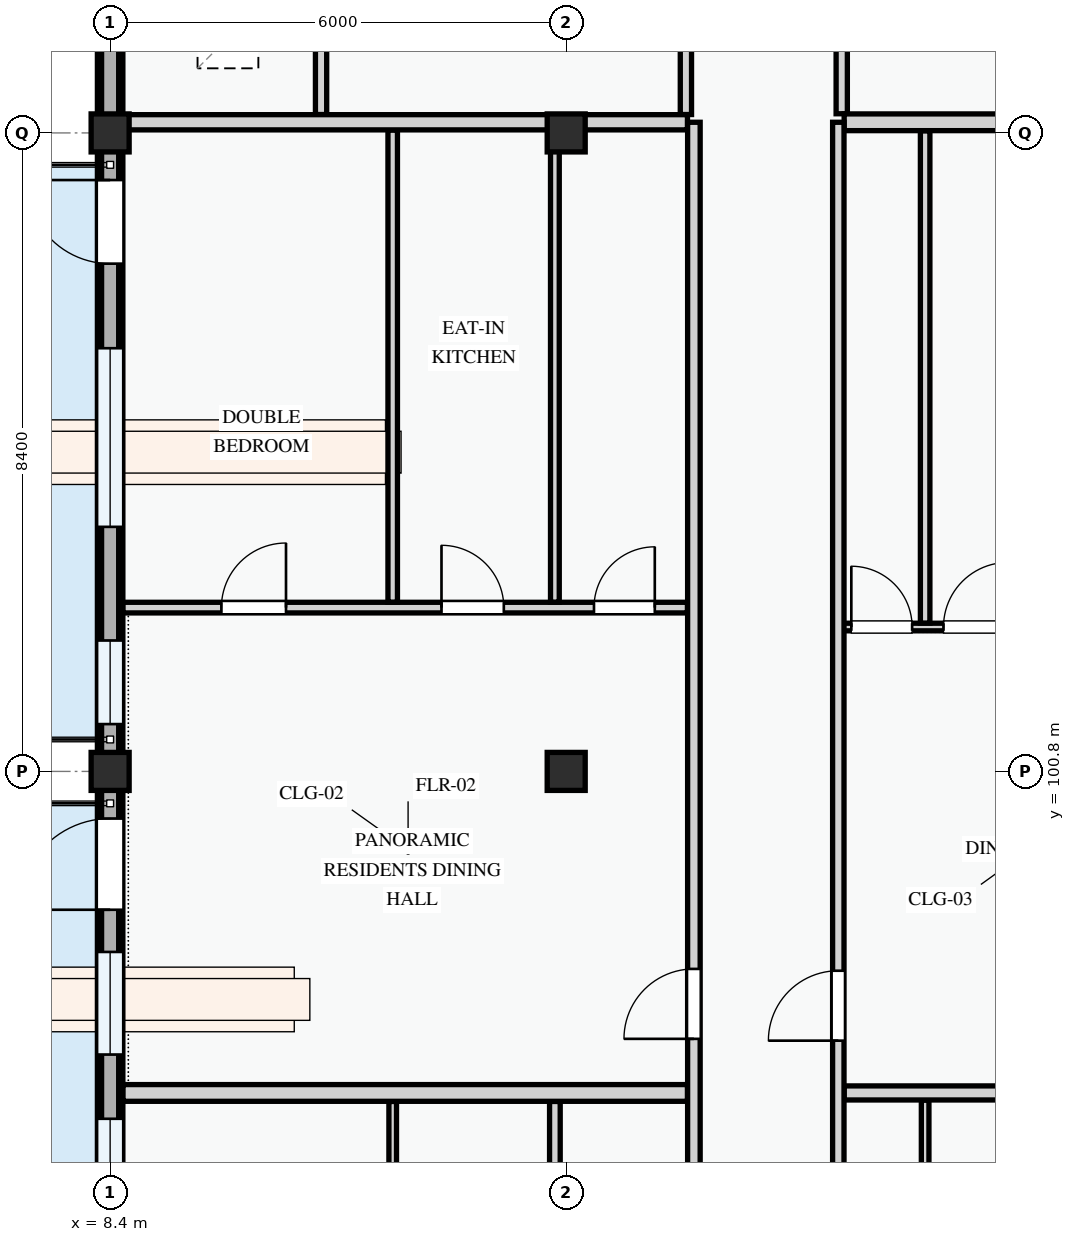
"""IFC4 building model, lengths in metres.
Left out: names, types, materials, properties, quantities, classifications, styles, units other than length and angle.
Written with IfcOpenShell. Run it as: python <this file> out.ifc"""

import sys

from ifc_helpers import new_model, si_unit, direction, frame, frame_2d, origin, origin_2d, place, context, subcontext, project, spatial, polyline, rectangle, outline, extrude, element, fill, save


model = new_model("IFC4")
c1 = context("Model", 3, precision=1e-05, world=origin(), true_north=direction((0.0, 1.0)))
c2 = subcontext(c1, "Body", "Model", "MODEL_VIEW")
j1 = project(units=[si_unit("LENGTHUNIT", "METRE"), si_unit("PLANEANGLEUNIT", "RADIAN")], contexts=[c1])
p1 = place(None, origin())
s1 = spatial("IfcSite", under=j1, at=p1, CompositionType="ELEMENT")
p2 = place(p1, origin())
s2 = spatial("IfcBuilding", under=s1, at=p2, CompositionType="ELEMENT")
p3 = place(p2, frame((0.0, 0.0, 51.0)))
s3 = spatial("IfcBuildingStorey", under=s2, at=p3, CompositionType="ELEMENT", Elevation=51.0)
for number, where, z_axis, x_axis in (
    (1, (8.4, 100.8, 0.0), (0.0, 0.0, 1.0), (1.0, 0.0, 0.0)),
    (2, (8.4, 109.2, 0.0), (0.0, 0.0, 1.0), (1.0, 0.0, 0.0)),
    (3, (14.4, 100.8, 0.0), (0.0, 0.0, 1.0), (1.0, 0.0, 0.0)),
    (4, (14.4, 109.2, 0.0), (0.0, 0.0, 1.0), (1.0, 0.0, 0.0)),
):
    element("IfcColumn", number, at=place(p3, frame(where, z_axis=z_axis, x_axis=x_axis)), inside=s3, PredefinedType="COLUMN", context=c2, shape_type="SweptSolid", body=[
        extrude(rectangle(XDim=0.5, YDim=0.5, at=origin_2d()), origin(), (0.0, 0.0, 1.0), 3.3),
    ])
p4 = place(p3, frame((8.4, 115.2, 0.0), z_axis=(0.0, 0.0, 1.0), x_axis=(0.0, -1.0, 0.0)))
e5 = element("IfcWall", 5, at=p4, inside=s3, PredefinedType="STANDARD", context=c2, shape_type="SweptSolid", body=[
    extrude(rectangle(XDim=6.0, YDim=0.335, at=frame_2d((3.0, 0.0))), origin(), (0.0, 0.0, 1.0), 2.595),
])
p5 = place(p4, frame((0.545, 0.0, 0.78)))
e6 = element("IfcOpeningElement", 6, at=p5, cuts=e5, PredefinedType="OPENING", context=c2, shape_type="SweptSolid", body=[
    extrude(rectangle(XDim=0.9, YDim=1.2, at=frame_2d((0.45, 0.6))), frame((0.0, 0.177, 0.0), z_axis=(0.0, -1.0, 0.0), x_axis=(1.0, 0.0, 0.0)), (0.0, 0.0, 1.0), 0.355),
])
p6 = place(p4, frame((2.815, 0.0, 0.78)))
e7 = element("IfcOpeningElement", 7, at=p6, cuts=e5, PredefinedType="OPENING", context=c2, shape_type="SweptSolid", body=[
    extrude(rectangle(XDim=1.98, YDim=1.5, at=frame_2d((0.99, 0.75))), frame((0.0, 0.177, 0.0), z_axis=(0.0, -1.0, 0.0), x_axis=(1.0, 0.0, 0.0)), (0.0, 0.0, 1.0), 0.355),
])
p7 = place(p3, frame((8.4, 109.2, 0.0), z_axis=(0.0, 0.0, 1.0), x_axis=(0.0, -1.0, 0.0)))
e8 = element("IfcWall", 8, at=p7, inside=s3, PredefinedType="STANDARD", context=c2, shape_type="SweptSolid", body=[
    extrude(rectangle(XDim=8.4, YDim=0.335, at=frame_2d((4.2, 0.0))), origin(), (0.0, 0.0, 1.0), 2.445),
])
p8 = place(p7, frame((0.62, 0.0, 0.0)))
e9 = element("IfcOpeningElement", 9, at=p8, cuts=e8, PredefinedType="OPENING", context=c2, shape_type="SweptSolid", body=[
    extrude(rectangle(XDim=1.1, YDim=2.15, at=frame_2d((0.55, 1.075))), frame((0.0, 0.177, 0.0), z_axis=(0.0, -1.0, 0.0), x_axis=(1.0, 0.0, 0.0)), (0.0, 0.0, 1.0), 0.355),
])
p9 = place(p7, frame((2.833, 0.0, 0.78)))
e10 = element("IfcOpeningElement", 10, at=p9, cuts=e8, PredefinedType="OPENING", context=c2, shape_type="SweptSolid", body=[
    extrude(rectangle(XDim=2.35, YDim=1.55, at=frame_2d((1.175, 0.775))), frame((0.0, 0.177, 0.0), z_axis=(0.0, -1.0, 0.0), x_axis=(1.0, 0.0, 0.0)), (0.0, 0.0, 1.0), 0.355),
])
p10 = place(p7, frame((6.677, 0.0, 0.78)))
e11 = element("IfcOpeningElement", 11, at=p10, cuts=e8, PredefinedType="OPENING", context=c2, shape_type="SweptSolid", body=[
    extrude(rectangle(XDim=1.1, YDim=1.3, at=frame_2d((0.55, 0.65))), frame((0.0, 0.177, 0.0), z_axis=(0.0, -1.0, 0.0), x_axis=(1.0, 0.0, 0.0)), (0.0, 0.0, 1.0), 0.355),
])
p11 = place(p3, frame((8.4, 100.8, 0.0), z_axis=(0.0, 0.0, 1.0), x_axis=(0.0, -1.0, 0.0)))
e12 = element("IfcWall", 12, at=p11, inside=s3, PredefinedType="STANDARD", context=c2, shape_type="SweptSolid", body=[
    extrude(rectangle(XDim=6.0, YDim=0.335, at=frame_2d((3.0, 0.0))), origin(), (0.0, 0.0, 1.0), 2.595),
])
p12 = place(p11, frame((0.62, 0.0, 0.0)))
e13 = element("IfcOpeningElement", 13, at=p12, cuts=e12, PredefinedType="OPENING", context=c2, shape_type="SweptSolid", body=[
    extrude(rectangle(XDim=1.2, YDim=2.15, at=frame_2d((0.6, 1.075))), frame((0.0, 0.177, 0.0), z_axis=(0.0, -1.0, 0.0), x_axis=(1.0, 0.0, 0.0)), (0.0, 0.0, 1.0), 0.355),
])
p13 = place(p11, frame((2.375, 0.0, 0.78)))
e14 = element("IfcOpeningElement", 14, at=p13, cuts=e12, PredefinedType="OPENING", context=c2, shape_type="SweptSolid", body=[
    extrude(rectangle(XDim=1.35, YDim=1.55, at=frame_2d((0.675, 0.775))), frame((0.0, 0.177, 0.0), z_axis=(0.0, -1.0, 0.0), x_axis=(1.0, 0.0, 0.0)), (0.0, 0.0, 1.0), 0.355),
])
p14 = place(p11, frame((4.57, 0.0, 0.78)))
e15 = element("IfcOpeningElement", 15, at=p14, cuts=e12, PredefinedType="OPENING", context=c2, shape_type="SweptSolid", body=[
    extrude(rectangle(XDim=0.9, YDim=1.2, at=frame_2d((0.45, 0.6))), frame((0.0, 0.177, 0.0), z_axis=(0.0, -1.0, 0.0), x_axis=(1.0, 0.0, 0.0)), (0.0, 0.0, 1.0), 0.355),
])
p15 = place(p3, frame((8.4, 115.2, 3.3), z_axis=(0.0, 0.0, 1.0), x_axis=(0.0, -1.0, 0.0)))
e16 = element("IfcWall", 16, at=p15, inside=s3, PredefinedType="PARAPET", context=c2, shape_type="SweptSolid", body=[
    extrude(outline(polyline([(0.0, 0.0), (6.0, 0.0), (6.0, 1.12), (5.5, 1.322), (5.0, 1.484), (4.5, 1.618), (4.0, 1.717), (3.5, 1.779), (3.0, 1.8), (2.5, 1.779), (2.0, 1.717), (1.5, 1.618), (1.0, 1.484), (0.5, 1.322), (0.0, 1.12), (0.0, 0.0)])), frame((0.0, 0.113, 0.0), z_axis=(0.0, -1.0, 0.0), x_axis=(1.0, 0.0, 0.0)), (0.0, 0.0, 1.0), 0.225),
])
p16 = place(p3, frame((8.4, 109.2, 3.3), z_axis=(0.0, 0.0, 1.0), x_axis=(0.0, -1.0, 0.0)))
e17 = element("IfcWall", 17, at=p16, inside=s3, PredefinedType="PARAPET", context=c2, shape_type="SweptSolid", body=[
    extrude(outline(polyline([(0.0, 0.0), (8.4, 0.0), (8.4, 1.12), (7.7, 1.322), (7.0, 1.484), (6.3, 1.618), (5.6, 1.717), (4.9, 1.779), (4.2, 1.8), (3.5, 1.779), (2.8, 1.717), (2.1, 1.618), (1.4, 1.484), (0.7, 1.322), (0.0, 1.12), (0.0, 0.0)])), frame((0.0, 0.113, 0.0), z_axis=(0.0, -1.0, 0.0), x_axis=(1.0, 0.0, 0.0)), (0.0, 0.0, 1.0), 0.225),
])
p17 = place(p3, frame((8.4, 100.8, 3.3), z_axis=(0.0, 0.0, 1.0), x_axis=(0.0, -1.0, 0.0)))
e18 = element("IfcWall", 18, at=p17, inside=s3, PredefinedType="PARAPET", context=c2, shape_type="SweptSolid", body=[
    extrude(outline(polyline([(0.0, 0.0), (6.0, 0.0), (6.0, 1.12), (5.5, 1.322), (5.0, 1.484), (4.5, 1.618), (4.0, 1.717), (3.5, 1.779), (3.0, 1.8), (2.5, 1.779), (2.0, 1.717), (1.5, 1.618), (1.0, 1.484), (0.5, 1.322), (0.0, 1.12), (0.0, 0.0)])), frame((0.0, 0.113, 0.0), z_axis=(0.0, -1.0, 0.0), x_axis=(1.0, 0.0, 0.0)), (0.0, 0.0, 1.0), 0.225),
])
for number, where, z_axis, x_axis in (
    (19, (11.175, 113.324, 0.0), (0.0, 0.0, 1.0), (0.0, -1.0, 0.0)),
    (20, (15.975, 113.324, 0.0), (0.0, 0.0, 1.0), (0.0, -1.0, 0.0)),
):
    element("IfcWall", number, at=place(p3, frame(where, z_axis=z_axis, x_axis=x_axis)), inside=s3, PredefinedType="PARTITIONING", context=c2, shape_type="SweptSolid", body=[
        extrude(rectangle(XDim=3.882, YDim=0.148, at=frame_2d((1.941, 0.0))), origin(), (0.0, 0.0, 1.0), 3.0),
    ])
p18 = place(p3, frame((18.025, 113.324, 0.0), z_axis=(0.0, 0.0, 1.0), x_axis=(0.0, -1.0, 0.0)))
e21 = element("IfcWall", 21, at=p18, inside=s3, PredefinedType="PARTITIONING", context=c2, shape_type="SweptSolid", body=[
    extrude(rectangle(XDim=3.872, YDim=0.148, at=frame_2d((1.936, 0.0))), origin(), (0.0, 0.0, 1.0), 3.0),
])
p19 = place(p3, frame((12.118, 91.574, 0.0), z_axis=(0.0, 0.0, 1.0), x_axis=(0.0, 1.0, 0.0)))
e22 = element("IfcWall", 22, at=p19, inside=s3, PredefinedType="PARTITIONING", context=c2, shape_type="SweptSolid", body=[
    extrude(rectangle(XDim=4.884, YDim=0.1, at=frame_2d((2.442, 0.0))), origin(), (0.0, 0.0, 1.0), 3.0),
])
p20 = place(p3, frame((14.251, 91.574, 0.0), z_axis=(0.0, 0.0, 1.0), x_axis=(0.0, 1.0, 0.0)))
e23 = element("IfcWall", 23, at=p20, inside=s3, PredefinedType="PARTITIONING", context=c2, shape_type="SweptSolid", body=[
    extrude(rectangle(XDim=4.884, YDim=0.14, at=frame_2d((2.442, 0.0))), origin(), (0.0, 0.0, 1.0), 2.445),
])
p21 = place(p3, frame((19.122, 91.377, 0.0), z_axis=(0.0, 0.0, 1.0), x_axis=(0.0, 1.0, 0.0)))
e24 = element("IfcWall", 24, at=p21, inside=s3, PredefinedType="PARTITIONING", context=c2, shape_type="SweptSolid", body=[
    extrude(rectangle(XDim=5.098, YDim=0.1, at=frame_2d((2.549, 0.0))), origin(), (0.0, 0.0, 1.0), 3.0),
])
p22 = place(p3, frame((8.57, 102.955, 0.0), z_axis=(0.0, 0.0, 1.0), x_axis=(1.0, 0.0, 0.0)))
e25 = element("IfcWall", 25, at=p22, inside=s3, PredefinedType="PARTITIONING", context=c2, shape_type="SweptSolid", body=[
    extrude(rectangle(XDim=7.426, YDim=0.14, at=frame_2d((3.713, 0.0))), origin(), (0.0, 0.0, 1.0), 3.0),
])
p23 = place(p22, frame((1.294, 0.0, 0.0)))
e26 = element("IfcOpeningElement", 26, at=p23, cuts=e25, PredefinedType="OPENING", context=c2, shape_type="SweptSolid", body=[
    extrude(rectangle(XDim=0.85, YDim=2.1, at=frame_2d((0.425, 1.05))), frame((0.0, 0.08, 0.0), z_axis=(0.0, -1.0, 0.0), x_axis=(1.0, 0.0, 0.0)), (0.0, 0.0, 1.0), 0.16),
])
p24 = place(p22, frame((4.19, 0.0, 0.0)))
e27 = element("IfcOpeningElement", 27, at=p24, cuts=e25, PredefinedType="OPENING", context=c2, shape_type="SweptSolid", body=[
    extrude(rectangle(XDim=0.82, YDim=2.08, at=frame_2d((0.41, 1.04))), frame((0.0, 0.08, 0.0), z_axis=(0.0, -1.0, 0.0), x_axis=(1.0, 0.0, 0.0)), (0.0, 0.0, 1.0), 0.16),
])
p25 = place(p22, frame((6.196, 0.0, 0.0)))
e28 = element("IfcOpeningElement", 28, at=p25, cuts=e25, PredefinedType="OPENING", context=c2, shape_type="SweptSolid", body=[
    extrude(rectangle(XDim=0.8, YDim=2.1, at=frame_2d((0.4, 1.05))), frame((0.0, 0.08, 0.0), z_axis=(0.0, -1.0, 0.0), x_axis=(1.0, 0.0, 0.0)), (0.0, 0.0, 1.0), 0.16),
])
p26 = place(p3, frame((12.118, 103.027, 0.0), z_axis=(0.0, 0.0, 1.0), x_axis=(0.0, 1.0, 0.0)))
e29 = element("IfcWall", 29, at=p26, inside=s3, PredefinedType="PARTITIONING", context=c2, shape_type="SweptSolid", body=[
    extrude(rectangle(XDim=6.211, YDim=0.125, at=frame_2d((3.105, 0.0))), origin(), (0.0, 0.0, 1.0), 3.0),
])
p27 = place(p3, frame((14.251, 103.027, 0.0), z_axis=(0.0, 0.0, 1.0), x_axis=(0.0, 1.0, 0.0)))
e30 = element("IfcWall", 30, at=p27, inside=s3, PredefinedType="PARTITIONING", context=c2, shape_type="SweptSolid", body=[
    extrude(rectangle(XDim=6.211, YDim=0.115, at=frame_2d((3.105, 0.0))), origin(), (0.0, 0.0, 1.0), 2.445),
])
p28 = place(p3, frame((17.98, 102.7, 0.0), z_axis=(0.0, 0.0, 1.0), x_axis=(1.0, 0.0, 0.0)))
e31 = element("IfcWall", 31, at=p28, inside=s3, PredefinedType="PARTITIONING", context=c2, shape_type="SweptSolid", body=[
    extrude(rectangle(XDim=4.651, YDim=0.1, at=frame_2d((2.325, 0.0))), origin(), (0.0, 0.0, 1.0), 3.0),
])
p29 = place(p28, frame((0.171, 0.0, 0.0)))
e32 = element("IfcOpeningElement", 32, at=p29, cuts=e31, PredefinedType="OPENING", context=c2, shape_type="SweptSolid", body=[
    extrude(rectangle(XDim=0.8, YDim=2.1, at=frame_2d((0.4, 1.05))), frame((0.0, 0.06, 0.0), z_axis=(0.0, -1.0, 0.0), x_axis=(1.0, 0.0, 0.0)), (0.0, 0.0, 1.0), 0.12),
])
p30 = place(p28, frame((1.384, 0.0, 0.0)))
e33 = element("IfcOpeningElement", 33, at=p30, cuts=e31, PredefinedType="OPENING", context=c2, shape_type="SweptSolid", body=[
    extrude(rectangle(XDim=0.85, YDim=2.1, at=frame_2d((0.425, 1.05))), frame((0.0, 0.06, 0.0), z_axis=(0.0, -1.0, 0.0), x_axis=(1.0, 0.0, 0.0)), (0.0, 0.0, 1.0), 0.12),
])
p31 = place(p28, frame((3.193, 0.0, 0.0)))
e34 = element("IfcOpeningElement", 34, at=p31, cuts=e31, PredefinedType="OPENING", context=c2, shape_type="SweptSolid", body=[
    extrude(rectangle(XDim=0.82, YDim=2.08, at=frame_2d((0.41, 1.04))), frame((0.0, 0.06, 0.0), z_axis=(0.0, -1.0, 0.0), x_axis=(1.0, 0.0, 0.0)), (0.0, 0.0, 1.0), 0.12),
])
p32 = place(p3, frame((19.122, 102.752, 0.0), z_axis=(0.0, 0.0, 1.0), x_axis=(0.0, 1.0, 0.0)))
e35 = element("IfcWall", 35, at=p32, inside=s3, PredefinedType="PARTITIONING", context=c2, shape_type="SweptSolid", body=[
    extrude(rectangle(XDim=6.476, YDim=0.125, at=frame_2d((3.238, 0.0))), origin(), (0.0, 0.0, 1.0), 3.0),
])
p33 = place(p3, frame((8.57, 96.57, 0.0), z_axis=(0.0, 0.0, 1.0), x_axis=(1.0, 0.0, 0.0)))
e36 = element("IfcWall", 36, at=p33, inside=s3, PredefinedType="PARTITIONING", context=c2, shape_type="SweptSolid", body=[
    extrude(rectangle(XDim=7.426, YDim=0.22, at=frame_2d((3.713, 0.0))), origin(), (0.0, 0.0, 1.0), 3.0),
])
p34 = place(p3, frame((18.057, 96.57, 0.0), z_axis=(0.0, 0.0, 1.0), x_axis=(1.0, 0.0, 0.0)))
e37 = element("IfcWall", 37, at=p34, inside=s3, PredefinedType="PARTITIONING", context=c2, shape_type="SweptSolid", body=[
    extrude(rectangle(XDim=4.683, YDim=0.185, at=frame_2d((2.342, 0.0))), origin(), (0.0, 0.0, 1.0), 3.0),
])
p35 = place(p3, frame((8.57, 109.34, 0.0), z_axis=(0.0, 0.0, 1.0), x_axis=(1.0, 0.0, 0.0)))
e38 = element("IfcWall", 38, at=p35, inside=s3, PredefinedType="PARTITIONING", context=c2, shape_type="SweptSolid", body=[
    extrude(rectangle(XDim=7.426, YDim=0.2, at=frame_2d((3.713, 0.0))), origin(), (0.0, 0.0, 1.0), 2.395),
])
p36 = place(p3, frame((18.057, 109.34, 0.0), z_axis=(0.0, 0.0, 1.0), x_axis=(1.0, 0.0, 0.0)))
e39 = element("IfcWall", 39, at=p36, inside=s3, PredefinedType="PARTITIONING", context=c2, shape_type="SweptSolid", body=[
    extrude(rectangle(XDim=4.683, YDim=0.22, at=frame_2d((2.342, 0.0))), origin(), (0.0, 0.0, 1.0), 2.395),
])
p37 = place(p3, frame((16.08, 86.46, 0.0), z_axis=(0.0, 0.0, 1.0), x_axis=(0.0, 1.0, 0.0)))
e40 = element("IfcWall", 40, at=p37, inside=s3, PredefinedType="PARTITIONING", context=c2, shape_type="SweptSolid", body=[
    extrude(rectangle(XDim=22.88, YDim=0.165, at=frame_2d((11.44, 0.0))), origin(), (0.0, 0.0, 1.0), 3.0),
])
p38 = place(p37, frame((3.62, 0.0, 0.0)))
e41 = element("IfcOpeningElement", 41, at=p38, cuts=e40, PredefinedType="OPENING", context=c2, shape_type="SweptSolid", body=[
    extrude(rectangle(XDim=0.92, YDim=2.1, at=frame_2d((0.46, 1.05))), frame((0.0, 0.093, 0.0), z_axis=(0.0, -1.0, 0.0), x_axis=(1.0, 0.0, 0.0)), (0.0, 0.0, 1.0), 0.185),
])
p39 = place(p37, frame((10.822, 0.0, 0.0)))
e42 = element("IfcOpeningElement", 42, at=p39, cuts=e40, PredefinedType="OPENING", context=c2, shape_type="SweptSolid", body=[
    extrude(rectangle(XDim=0.92, YDim=2.1, at=frame_2d((0.46, 1.05))), frame((0.0, 0.093, 0.0), z_axis=(0.0, -1.0, 0.0), x_axis=(1.0, 0.0, 0.0)), (0.0, 0.0, 1.0), 0.185),
])
p40 = place(p3, frame((17.98, 86.46, 0.0), z_axis=(0.0, 0.0, 1.0), x_axis=(0.0, 1.0, 0.0)))
e43 = element("IfcWall", 43, at=p40, inside=s3, PredefinedType="PARTITIONING", context=c2, shape_type="SweptSolid", body=[
    extrude(rectangle(XDim=22.88, YDim=0.15, at=frame_2d((11.44, 0.0))), origin(), (0.0, 0.0, 1.0), 3.0),
])
p41 = place(p40, frame((3.643, 0.0, 0.0)))
e44 = element("IfcOpeningElement", 44, at=p41, cuts=e43, PredefinedType="OPENING", context=c2, shape_type="SweptSolid", body=[
    extrude(rectangle(XDim=0.96, YDim=2.12, at=frame_2d((0.48, 1.06))), frame((0.0, 0.085, 0.0), z_axis=(0.0, -1.0, 0.0), x_axis=(1.0, 0.0, 0.0)), (0.0, 0.0, 1.0), 0.17),
])
p42 = place(p40, frame((10.798, 0.0, 0.0)))
e45 = element("IfcOpeningElement", 45, at=p42, cuts=e43, PredefinedType="OPENING", context=c2, shape_type="SweptSolid", body=[
    extrude(rectangle(XDim=0.92, YDim=2.1, at=frame_2d((0.46, 1.05))), frame((0.0, 0.085, 0.0), z_axis=(0.0, -1.0, 0.0), x_axis=(1.0, 0.0, 0.0)), (0.0, 0.0, 1.0), 0.17),
])
p43 = place(p8, frame((1.1, 0.0, 0.0), z_axis=(0.0, 0.0, 1.0), x_axis=(-1.0, 0.0, 0.0)))
e46 = element("IfcDoor", 46, at=p43, inside=s3, OperationType="SINGLE_SWING_RIGHT", PredefinedType="DOOR", context=c2, shape_type="SweptSolid", body=[
    extrude(rectangle(XDim=1.1, YDim=2.15, at=frame_2d((0.55, 1.075))), frame((0.0, 0.025, 0.0), z_axis=(0.0, -1.0, 0.0), x_axis=(1.0, 0.0, 0.0)), (0.0, 0.0, 1.0), 0.05),
])
fill(e9, e46)
p44 = place(p9, origin())
e47 = element("IfcWindow", 47, at=p44, inside=s3, PartitioningType="DOUBLE_PANEL_VERTICAL", PredefinedType="WINDOW", context=c2, shape_type="SweptSolid", body=[
    extrude(rectangle(XDim=2.35, YDim=1.55, at=frame_2d((1.175, 0.775))), frame((0.0, 0.03, 0.0), z_axis=(0.0, -1.0, 0.0), x_axis=(1.0, 0.0, 0.0)), (0.0, 0.0, 1.0), 0.06),
])
fill(e10, e47)
p45 = place(p10, origin())
e48 = element("IfcWindow", 48, at=p45, inside=s3, PartitioningType="SINGLE_PANEL", PredefinedType="WINDOW", context=c2, shape_type="SweptSolid", body=[
    extrude(rectangle(XDim=1.1, YDim=1.3, at=frame_2d((0.55, 0.65))), frame((0.0, 0.03, 0.0), z_axis=(0.0, -1.0, 0.0), x_axis=(1.0, 0.0, 0.0)), (0.0, 0.0, 1.0), 0.06),
])
fill(e11, e48)
p46 = place(p12, frame((1.2, 0.0, 0.0), z_axis=(0.0, 0.0, 1.0), x_axis=(-1.0, 0.0, 0.0)))
e49 = element("IfcDoor", 49, at=p46, inside=s3, OperationType="SINGLE_SWING_LEFT", PredefinedType="DOOR", context=c2, shape_type="SweptSolid", body=[
    extrude(rectangle(XDim=1.2, YDim=2.15, at=frame_2d((0.6, 1.075))), frame((0.0, 0.025, 0.0), z_axis=(0.0, -1.0, 0.0), x_axis=(1.0, 0.0, 0.0)), (0.0, 0.0, 1.0), 0.05),
])
fill(e13, e49)
p47 = place(p13, origin())
e50 = element("IfcWindow", 50, at=p47, inside=s3, PartitioningType="SINGLE_PANEL", PredefinedType="WINDOW", context=c2, shape_type="SweptSolid", body=[
    extrude(rectangle(XDim=1.35, YDim=1.55, at=frame_2d((0.675, 0.775))), frame((0.0, 0.03, 0.0), z_axis=(0.0, -1.0, 0.0), x_axis=(1.0, 0.0, 0.0)), (0.0, 0.0, 1.0), 0.06),
])
fill(e14, e50)
p48 = place(p14, origin())
e51 = element("IfcWindow", 51, at=p48, inside=s3, PartitioningType="SINGLE_PANEL", PredefinedType="WINDOW", context=c2, shape_type="SweptSolid", body=[
    extrude(rectangle(XDim=0.9, YDim=1.2, at=frame_2d((0.45, 0.6))), frame((0.0, 0.03, 0.0), z_axis=(0.0, -1.0, 0.0), x_axis=(1.0, 0.0, 0.0)), (0.0, 0.0, 1.0), 0.06),
])
fill(e15, e51)
p49 = place(p23, origin())
e52 = element("IfcDoor", 52, at=p49, inside=s3, OperationType="SINGLE_SWING_RIGHT", PredefinedType="DOOR", context=c2, shape_type="SweptSolid", body=[
    extrude(rectangle(XDim=0.85, YDim=2.1, at=frame_2d((0.425, 1.05))), frame((0.0, 0.025, 0.0), z_axis=(0.0, -1.0, 0.0), x_axis=(1.0, 0.0, 0.0)), (0.0, 0.0, 1.0), 0.05),
])
fill(e26, e52)
p50 = place(p24, origin())
e53 = element("IfcDoor", 53, at=p50, inside=s3, OperationType="SINGLE_SWING_LEFT", PredefinedType="DOOR", context=c2, shape_type="SweptSolid", body=[
    extrude(rectangle(XDim=0.82, YDim=2.08, at=frame_2d((0.41, 1.04))), frame((0.0, 0.025, 0.0), z_axis=(0.0, -1.0, 0.0), x_axis=(1.0, 0.0, 0.0)), (0.0, 0.0, 1.0), 0.05),
])
fill(e27, e53)
p51 = place(p25, origin())
e54 = element("IfcDoor", 54, at=p51, inside=s3, OperationType="SINGLE_SWING_RIGHT", PredefinedType="DOOR", context=c2, shape_type="SweptSolid", body=[
    extrude(rectangle(XDim=0.8, YDim=2.1, at=frame_2d((0.4, 1.05))), frame((0.0, 0.025, 0.0), z_axis=(0.0, -1.0, 0.0), x_axis=(1.0, 0.0, 0.0)), (0.0, 0.0, 1.0), 0.05),
])
fill(e28, e54)
p52 = place(p29, origin())
e55 = element("IfcDoor", 55, at=p52, inside=s3, OperationType="SINGLE_SWING_LEFT", PredefinedType="DOOR", context=c2, shape_type="SweptSolid", body=[
    extrude(rectangle(XDim=0.8, YDim=2.1, at=frame_2d((0.4, 1.05))), frame((0.0, 0.025, 0.0), z_axis=(0.0, -1.0, 0.0), x_axis=(1.0, 0.0, 0.0)), (0.0, 0.0, 1.0), 0.05),
])
fill(e32, e55)
p53 = place(p30, origin())
e56 = element("IfcDoor", 56, at=p53, inside=s3, OperationType="SINGLE_SWING_RIGHT", PredefinedType="DOOR", context=c2, shape_type="SweptSolid", body=[
    extrude(rectangle(XDim=0.85, YDim=2.1, at=frame_2d((0.425, 1.05))), frame((0.0, 0.025, 0.0), z_axis=(0.0, -1.0, 0.0), x_axis=(1.0, 0.0, 0.0)), (0.0, 0.0, 1.0), 0.05),
])
fill(e33, e56)
p54 = place(p39, origin())
e57 = element("IfcDoor", 57, at=p54, inside=s3, OperationType="SINGLE_SWING_LEFT", PredefinedType="DOOR", context=c2, shape_type="SweptSolid", body=[
    extrude(rectangle(XDim=0.92, YDim=2.1, at=frame_2d((0.46, 1.05))), frame((0.0, 0.025, 0.0), z_axis=(0.0, -1.0, 0.0), x_axis=(1.0, 0.0, 0.0)), (0.0, 0.0, 1.0), 0.05),
])
fill(e42, e57)
p55 = place(p42, origin())
e58 = element("IfcDoor", 58, at=p55, inside=s3, OperationType="SINGLE_SWING_LEFT", PredefinedType="DOOR", context=c2, shape_type="SweptSolid", body=[
    extrude(rectangle(XDim=0.92, YDim=2.1, at=frame_2d((0.46, 1.05))), frame((0.0, 0.025, 0.0), z_axis=(0.0, -1.0, 0.0), x_axis=(1.0, 0.0, 0.0)), (0.0, 0.0, 1.0), 0.05),
])
fill(e45, e58)
save(model, sys.argv[1])
